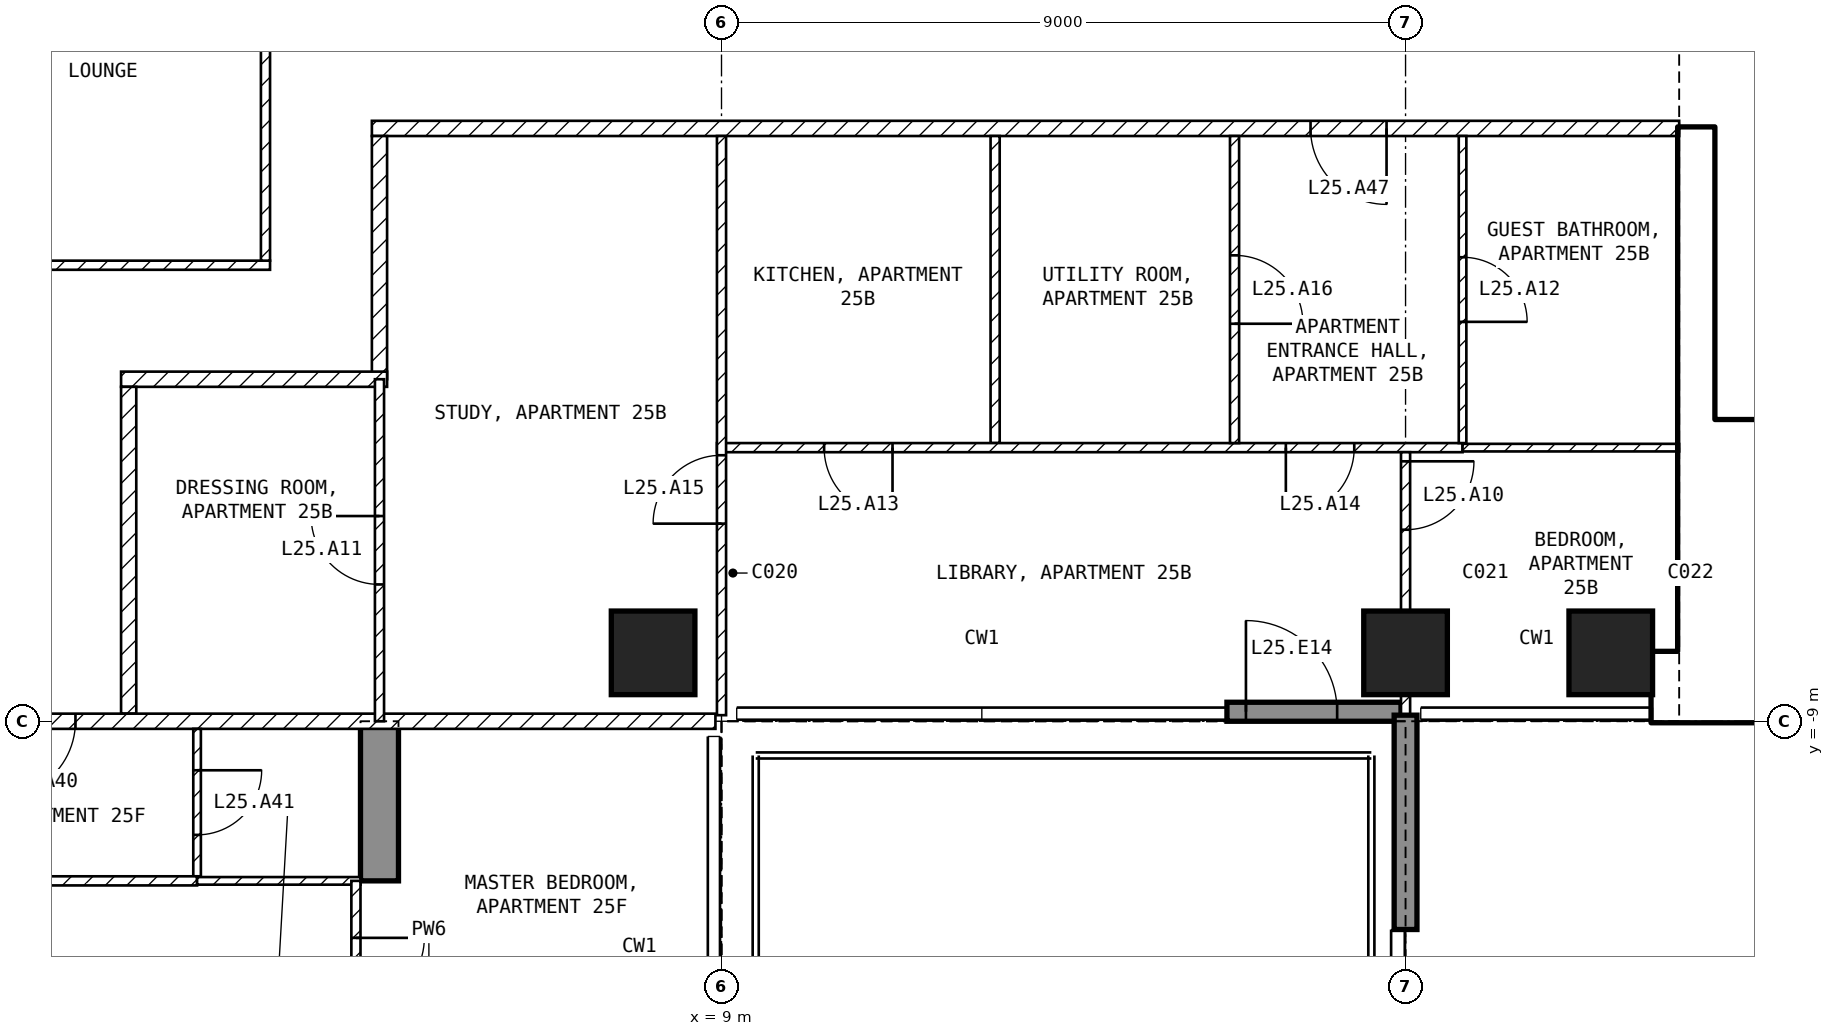
"""IFC4 building model, lengths in metres.
Left out: names, types, materials, properties, quantities, classifications, styles, units other than length and angle.
Written with IfcOpenShell. Run it as: python <this file> out.ifc"""

import sys

from ifc_helpers import new_model, si_unit, direction, frame, frame_2d, origin, origin_2d, place, context, subcontext, project, spatial, polyline, rectangle, outline, extrude, element, fill, save


model = new_model("IFC4")
c1 = context("Model", 3, precision=1e-05, world=origin(), true_north=direction((0.0, 1.0)))
c2 = subcontext(c1, "Body", "Model", "MODEL_VIEW")
j1 = project(units=[si_unit("LENGTHUNIT", "METRE"), si_unit("PLANEANGLEUNIT", "RADIAN")], contexts=[c1])
p1 = place(None, origin())
s1 = spatial("IfcSite", under=j1, at=p1, CompositionType="ELEMENT")
p2 = place(p1, origin())
s2 = spatial("IfcBuilding", under=s1, at=p2, CompositionType="ELEMENT")
p3 = place(p2, frame((0.0, 0.0, 109.4)))
s3 = spatial("IfcBuildingStorey", under=s2, at=p3, CompositionType="ELEMENT", Elevation=109.4)
for number, where, z_axis, x_axis in (
    (1, (8.1, -8.1, -0.25), (0.0, 0.0, 1.0), (1.0, 0.0, 0.0)),
    (2, (18.0, -8.1, -0.25), (0.0, 0.0, 1.0), (1.0, 0.0, 0.0)),
    (3, (20.7, -8.1, -0.25), (0.0, 0.0, 1.0), (1.0, 0.0, 0.0)),
):
    element("IfcColumn", number, at=place(p3, frame(where, z_axis=z_axis, x_axis=x_axis)), inside=s3, PredefinedType="COLUMN", context=c2, shape_type="SweptSolid", body=[
        extrude(rectangle(XDim=1.1, YDim=1.1, at=origin_2d()), origin(), (0.0, 0.0, 1.0), 3.5),
    ])
p4 = place(p3, frame((4.25, -20.15, -0.25), z_axis=(1.0, 0.0, 0.0), x_axis=(0.0, 1.0, 0.0)))
e4 = element("IfcWall", 4, at=p4, inside=s3, PredefinedType="SHEAR", context=c2, shape_type="SweptSolid", body=[
    extrude(outline(polyline([(0.0, 0.0), (6.65, 0.0), (6.65, 2.65), (9.05, 2.65), (9.05, 0.0), (11.15, 0.0), (11.15, 3.5), (0.0, 3.5), (0.0, 0.0)])), origin(), (0.0, 0.0, 1.0), 0.5),
])
p5 = place(p3, frame((15.65, -8.875, 0.0), z_axis=(0.0, 0.0, 1.0), x_axis=(1.0, 0.0, 0.0)))
e5 = element("IfcWall", 5, at=p5, inside=s3, PredefinedType="SOLIDWALL", context=c2, shape_type="SweptSolid", body=[
    extrude(rectangle(XDim=2.29, YDim=0.25, at=frame_2d((1.145, 0.0))), origin(), (0.0, 0.0, 1.0), 3.25),
])
p6 = place(p5, frame((0.25, 0.0, 0.0)))
e6 = element("IfcOpeningElement", 6, at=p6, cuts=e5, PredefinedType="OPENING", context=c2, shape_type="SweptSolid", body=[
    extrude(rectangle(XDim=1.2, YDim=2.4, at=frame_2d((0.6, 1.2))), frame((0.0, 0.135, 0.0), z_axis=(0.0, -1.0, 0.0), x_axis=(1.0, 0.0, 0.0)), (0.0, 0.0, 1.0), 0.27),
])
p7 = place(p3, frame((18.0, -8.92, 0.0), z_axis=(0.0, 0.0, 1.0), x_axis=(0.0, -1.0, 0.0)))
e7 = element("IfcWall", 7, at=p7, inside=s3, PredefinedType="SOLIDWALL", context=c2, shape_type="SweptSolid", body=[
    extrude(rectangle(XDim=2.82, YDim=0.3, at=frame_2d((1.41, 0.0))), origin(), (0.0, 0.0, 1.0), 3.25),
])
p8 = place(p3, frame((21.25, -8.55, 0.0), z_axis=(0.0, 0.0, 1.0), x_axis=(1.0, 0.0, 0.0)))
e8 = element("IfcWall", 8, at=p8, inside=s3, PredefinedType="SHEAR", context=c2, shape_type="SweptSolid", body=[
    extrude(rectangle(XDim=8.95, YDim=0.9, at=frame_2d((4.475, 0.0))), origin(), (0.0, 0.0, 1.0), 3.25),
])
p9 = place(p3, frame((21.825, -8.1, 0.0), z_axis=(0.0, 0.0, 1.0), x_axis=(0.0, 1.0, 0.0)))
e9 = element("IfcWall", 9, at=p9, inside=s3, PredefinedType="SHEAR", context=c2, shape_type="SweptSolid", body=[
    extrude(rectangle(XDim=6.9, YDim=0.45, at=frame_2d((3.45, 0.0))), origin(), (0.0, 0.0, 1.0), 3.25),
])
p10 = place(p3, frame((22.05, -5.15, 0.0), z_axis=(0.0, 0.0, 1.0), x_axis=(1.0, 0.0, 0.0)))
e10 = element("IfcWall", 10, at=p10, inside=s3, PredefinedType="SOLIDWALL", context=c2, shape_type="SweptSolid", body=[
    extrude(rectangle(XDim=6.3, YDim=0.2, at=frame_2d((3.15, 0.0))), origin(), (0.0, 0.0, 1.0), 3.25),
])
p11 = place(p10, frame((0.2, 0.0, 0.0)))
e11 = element("IfcOpeningElement", 11, at=p11, cuts=e10, PredefinedType="OPENING", context=c2, shape_type="SweptSolid", body=[
    extrude(rectangle(XDim=1.0, YDim=2.1, at=frame_2d((0.5, 1.05))), frame((0.0, 0.11, 0.0), z_axis=(0.0, -1.0, 0.0), x_axis=(1.0, 0.0, 0.0)), (0.0, 0.0, 1.0), 0.22),
])
p12 = place(p3, frame((-3.06, -3.0, 0.0), z_axis=(0.0, 0.0, 1.0), x_axis=(1.0, 0.0, 0.0)))
e12 = element("IfcWall", 12, at=p12, inside=s3, PredefinedType="PARTITIONING", context=c2, shape_type="SweptSolid", body=[
    extrude(rectangle(XDim=6.12, YDim=0.12, at=frame_2d((3.06, 0.0))), origin(), (0.0, 0.0, 1.0), 3.25),
])
p13 = place(p3, frame((3.0, -2.94, 0.0), z_axis=(0.0, 0.0, 1.0), x_axis=(0.0, 1.0, 0.0)))
e13 = element("IfcWall", 13, at=p13, inside=s3, PredefinedType="PARTITIONING", context=c2, shape_type="SweptSolid", body=[
    extrude(rectangle(XDim=5.88, YDim=0.12, at=frame_2d((2.94, 0.0))), origin(), (0.0, 0.0, 1.0), 3.25),
])
p14 = place(p3, frame((21.6, -1.2, 0.0), z_axis=(0.0, 0.0, 1.0), x_axis=(-1.0, 0.0, 0.0)))
e14 = element("IfcWall", 14, at=p14, inside=s3, PredefinedType="PARTITIONING", context=c2, shape_type="SweptSolid", body=[
    extrude(rectangle(XDim=17.2, YDim=0.2, at=frame_2d((8.6, 0.0))), origin(), (0.0, 0.0, 1.0), 3.25),
])
p15 = place(p14, frame((3.85, 0.0, 0.0)))
e15 = element("IfcOpeningElement", 15, at=p15, cuts=e14, PredefinedType="OPENING", context=c2, shape_type="SweptSolid", body=[
    extrude(rectangle(XDim=1.0, YDim=2.1, at=frame_2d((0.5, 1.05))), frame((0.0, 0.11, 0.0), z_axis=(0.0, -1.0, 0.0), x_axis=(1.0, 0.0, 0.0)), (0.0, 0.0, 1.0), 0.22),
])
p16 = place(p3, frame((4.5, -1.3, 0.0), z_axis=(0.0, 0.0, 1.0), x_axis=(0.0, -1.0, 0.0)))
e16 = element("IfcWall", 16, at=p16, inside=s3, PredefinedType="PARTITIONING", context=c2, shape_type="SweptSolid", body=[
    extrude(rectangle(XDim=3.2, YDim=0.2, at=frame_2d((1.6, 0.0))), origin(), (0.0, 0.0, 1.0), 3.25),
])
p17 = place(p3, frame((4.6, -4.5, 0.0), z_axis=(0.0, 0.0, 1.0), x_axis=(-1.0, 0.0, 0.0)))
e17 = element("IfcWall", 17, at=p17, inside=s3, PredefinedType="PARTITIONING", context=c2, shape_type="SweptSolid", body=[
    extrude(rectangle(XDim=3.5, YDim=0.2, at=frame_2d((1.75, 0.0))), origin(), (0.0, 0.0, 1.0), 3.25),
])
p18 = place(p3, frame((1.2, -4.6, 0.0), z_axis=(0.0, 0.0, 1.0), x_axis=(0.0, -1.0, 0.0)))
e18 = element("IfcWall", 18, at=p18, inside=s3, PredefinedType="PARTITIONING", context=c2, shape_type="SweptSolid", body=[
    extrude(rectangle(XDim=4.3, YDim=0.2, at=frame_2d((2.15, 0.0))), origin(), (0.0, 0.0, 1.0), 3.25),
])
p19 = place(p3, frame((8.92, -9.0, 0.0), z_axis=(0.0, 0.0, 1.0), x_axis=(-1.0, 0.0, 0.0)))
e19 = element("IfcWall", 19, at=p19, inside=s3, PredefinedType="PARTITIONING", context=c2, shape_type="SweptSolid", body=[
    extrude(rectangle(XDim=17.84, YDim=0.2, at=frame_2d((8.92, 0.0))), origin(), (0.0, 0.0, 1.0), 3.25),
])
p20 = place(p19, frame((8.42, 0.0, 0.0)))
e20 = element("IfcOpeningElement", 20, at=p20, cuts=e19, PredefinedType="OPENING", context=c2, shape_type="SweptSolid", body=[
    extrude(rectangle(XDim=1.0, YDim=2.1, at=frame_2d((0.5, 1.05))), frame((0.0, 0.11, 0.0), z_axis=(0.0, -1.0, 0.0), x_axis=(1.0, 0.0, 0.0)), (0.0, 0.0, 1.0), 0.22),
])
p21 = place(p3, frame((12.6, -1.3, 0.0), z_axis=(0.0, 0.0, 1.0), x_axis=(0.0, -1.0, 0.0)))
e21 = element("IfcWall", 21, at=p21, inside=s3, PredefinedType="PARTITIONING", context=c2, shape_type="SweptSolid", body=[
    extrude(rectangle(XDim=4.04, YDim=0.12, at=frame_2d((2.02, 0.0))), origin(), (0.0, 0.0, 1.0), 3.25),
])
p22 = place(p3, frame((18.75, -5.4, 0.0), z_axis=(0.0, 0.0, 1.0), x_axis=(-1.0, 0.0, 0.0)))
e22 = element("IfcWall", 22, at=p22, inside=s3, PredefinedType="PARTITIONING", context=c2, shape_type="SweptSolid", body=[
    extrude(rectangle(XDim=9.81, YDim=0.12, at=frame_2d((4.905, 0.0))), origin(), (0.0, 0.0, 1.0), 3.25),
])
p23 = place(p22, frame((7.5, 0.0, 0.0)))
e23 = element("IfcOpeningElement", 23, at=p23, cuts=e22, PredefinedType="OPENING", context=c2, shape_type="SweptSolid", body=[
    extrude(rectangle(XDim=0.9, YDim=2.1, at=frame_2d((0.45, 1.05))), frame((0.0, 0.07, 0.0), z_axis=(0.0, -1.0, 0.0), x_axis=(1.0, 0.0, 0.0)), (0.0, 0.0, 1.0), 0.14),
])
p24 = place(p22, frame((1.425, 0.0, 0.0)))
e24 = element("IfcOpeningElement", 24, at=p24, cuts=e22, PredefinedType="OPENING", context=c2, shape_type="SweptSolid", body=[
    extrude(rectangle(XDim=0.9, YDim=2.1, at=frame_2d((0.45, 1.05))), frame((0.0, 0.07, 0.0), z_axis=(0.0, -1.0, 0.0), x_axis=(1.0, 0.0, 0.0)), (0.0, 0.0, 1.0), 0.14),
])
p25 = place(p3, frame((9.0, -8.92, 0.0), z_axis=(0.0, 0.0, 1.0), x_axis=(0.0, 1.0, 0.0)))
e25 = element("IfcWall", 25, at=p25, inside=s3, PredefinedType="PARTITIONING", context=c2, shape_type="SweptSolid", body=[
    extrude(rectangle(XDim=7.62, YDim=0.12, at=frame_2d((3.81, 0.0))), origin(), (0.0, 0.0, 1.0), 3.25),
])
p26 = place(p25, frame((2.52, 0.0, 0.0)))
e26 = element("IfcOpeningElement", 26, at=p26, cuts=e25, PredefinedType="OPENING", context=c2, shape_type="SweptSolid", body=[
    extrude(rectangle(XDim=0.9, YDim=2.1, at=frame_2d((0.45, 1.05))), frame((0.0, 0.07, 0.0), z_axis=(0.0, -1.0, 0.0), x_axis=(1.0, 0.0, 0.0)), (0.0, 0.0, 1.0), 0.14),
])
p27 = place(p3, frame((15.75, -1.3, 0.0), z_axis=(0.0, 0.0, 1.0), x_axis=(0.0, -1.0, 0.0)))
e27 = element("IfcWall", 27, at=p27, inside=s3, PredefinedType="PARTITIONING", context=c2, shape_type="SweptSolid", body=[
    extrude(rectangle(XDim=4.04, YDim=0.12, at=frame_2d((2.02, 0.0))), origin(), (0.0, 0.0, 1.0), 3.25),
])
p28 = place(p27, frame((1.57, 0.0, 0.0)))
e28 = element("IfcOpeningElement", 28, at=p28, cuts=e27, PredefinedType="OPENING", context=c2, shape_type="SweptSolid", body=[
    extrude(rectangle(XDim=0.9, YDim=2.1, at=frame_2d((0.45, 1.05))), frame((0.0, 0.07, 0.0), z_axis=(0.0, -1.0, 0.0), x_axis=(1.0, 0.0, 0.0)), (0.0, 0.0, 1.0), 0.14),
])
p29 = place(p3, frame((18.75, -1.3, 0.0), z_axis=(0.0, 0.0, 1.0), x_axis=(0.0, -1.0, 0.0)))
e29 = element("IfcWall", 29, at=p29, inside=s3, PredefinedType="PARTITIONING", context=c2, shape_type="SweptSolid", body=[
    extrude(rectangle(XDim=4.04, YDim=0.1, at=frame_2d((2.02, 0.0))), origin(), (0.0, 0.0, 1.0), 3.25),
])
p30 = place(p29, frame((1.595, 0.0, 0.0)))
e30 = element("IfcOpeningElement", 30, at=p30, cuts=e29, PredefinedType="OPENING", context=c2, shape_type="SweptSolid", body=[
    extrude(rectangle(XDim=0.85, YDim=2.1, at=frame_2d((0.425, 1.05))), frame((0.0, 0.06, 0.0), z_axis=(0.0, -1.0, 0.0), x_axis=(1.0, 0.0, 0.0)), (0.0, 0.0, 1.0), 0.12),
])
p31 = place(p3, frame((21.6, -5.4, 0.0), z_axis=(0.0, 0.0, 1.0), x_axis=(-1.0, 0.0, 0.0)))
e31 = element("IfcWall", 31, at=p31, inside=s3, PredefinedType="PARTITIONING", context=c2, shape_type="SweptSolid", body=[
    extrude(rectangle(XDim=2.85, YDim=0.1, at=frame_2d((1.425, 0.0))), origin(), (0.0, 0.0, 1.0), 3.25),
])
p32 = place(p3, frame((18.0, -5.46, 0.0), z_axis=(0.0, 0.0, 1.0), x_axis=(0.0, -1.0, 0.0)))
e32 = element("IfcWall", 32, at=p32, inside=s3, PredefinedType="PARTITIONING", context=c2, shape_type="SweptSolid", body=[
    extrude(rectangle(XDim=3.46, YDim=0.12, at=frame_2d((1.73, 0.0))), origin(), (0.0, 0.0, 1.0), 2.414),
])
p33 = place(p32, frame((0.12, 0.0, 0.0)))
e33 = element("IfcOpeningElement", 33, at=p33, cuts=e32, PredefinedType="OPENING", context=c2, shape_type="SweptSolid", body=[
    extrude(rectangle(XDim=0.9, YDim=2.1, at=frame_2d((0.45, 1.05))), frame((0.0, 0.07, 0.0), z_axis=(0.0, -1.0, 0.0), x_axis=(1.0, 0.0, 0.0)), (0.0, 0.0, 1.0), 0.14),
])
p34 = place(p3, frame((4.5, -9.0, 0.0), z_axis=(0.0, 0.0, 1.0), x_axis=(0.0, 1.0, 0.0)))
e34 = element("IfcWall", 34, at=p34, inside=s3, PredefinedType="PARTITIONING", context=c2, shape_type="SweptSolid", body=[
    extrude(rectangle(XDim=4.5, YDim=0.12, at=frame_2d((2.25, 0.0))), origin(), (0.0, 0.0, 1.0), 3.25),
])
p35 = place(p34, frame((1.8, 0.0, 0.0)))
e35 = element("IfcOpeningElement", 35, at=p35, cuts=e34, PredefinedType="OPENING", context=c2, shape_type="SweptSolid", body=[
    extrude(rectangle(XDim=0.9, YDim=2.1, at=frame_2d((0.45, 1.05))), frame((0.0, 0.07, 0.0), z_axis=(0.0, -1.0, 0.0), x_axis=(1.0, 0.0, 0.0)), (0.0, 0.0, 1.0), 0.14),
])
p36 = place(p3, frame((2.1, -9.1, 0.0), z_axis=(0.0, 0.0, 1.0), x_axis=(0.0, -1.0, 0.0)))
e36 = element("IfcWall", 36, at=p36, inside=s3, PredefinedType="PARTITIONING", context=c2, shape_type="SweptSolid", body=[
    extrude(rectangle(XDim=1.94, YDim=0.1, at=frame_2d((0.97, 0.0))), origin(), (0.0, 0.0, 1.0), 3.25),
])
p37 = place(p36, frame((0.545, 0.0, 0.0)))
e37 = element("IfcOpeningElement", 37, at=p37, cuts=e36, PredefinedType="OPENING", context=c2, shape_type="SweptSolid", body=[
    extrude(rectangle(XDim=0.85, YDim=2.1, at=frame_2d((0.425, 1.05))), frame((0.0, 0.06, 0.0), z_axis=(0.0, -1.0, 0.0), x_axis=(1.0, 0.0, 0.0)), (0.0, 0.0, 1.0), 0.12),
])
p38 = place(p3, frame((2.1, -11.1, 0.0), z_axis=(0.0, 0.0, 1.0), x_axis=(-1.0, 0.0, 0.0)))
e38 = element("IfcWall", 38, at=p38, inside=s3, PredefinedType="PARTITIONING", context=c2, shape_type="SweptSolid", body=[
    extrude(rectangle(XDim=6.35, YDim=0.12, at=frame_2d((3.175, 0.0))), origin(), (0.0, 0.0, 1.0), 3.25),
])
p39 = place(p38, frame((2.725, 0.0, 0.0)))
e39 = element("IfcOpeningElement", 39, at=p39, cuts=e38, PredefinedType="OPENING", context=c2, shape_type="SweptSolid", body=[
    extrude(rectangle(XDim=0.9, YDim=2.1, at=frame_2d((0.45, 1.05))), frame((0.0, 0.07, 0.0), z_axis=(0.0, -1.0, 0.0), x_axis=(1.0, 0.0, 0.0)), (0.0, 0.0, 1.0), 0.14),
])
p40 = place(p3, frame((4.25, -11.1, 0.0), z_axis=(0.0, 0.0, 1.0), x_axis=(-1.0, 0.0, 0.0)))
e40 = element("IfcWall", 40, at=p40, inside=s3, PredefinedType="PARTITIONING", context=c2, shape_type="SweptSolid", body=[
    extrude(rectangle(XDim=2.15, YDim=0.1, at=frame_2d((1.075, 0.0))), origin(), (0.0, 0.0, 1.0), 3.25),
])
p41 = place(p3, frame((4.19, -11.1, 0.0), z_axis=(0.0, 0.0, 1.0), x_axis=(0.0, -1.0, 0.0)))
e41 = element("IfcWall", 41, at=p41, inside=s3, PredefinedType="PARTITIONING", context=c2, shape_type="SweptSolid", body=[
    extrude(rectangle(XDim=2.4, YDim=0.12, at=frame_2d((1.2, 0.0))), origin(), (0.0, 0.0, 1.0), 2.4),
])
p42 = place(p41, frame((0.75, 0.0, 0.0)))
e42 = element("IfcOpeningElement", 42, at=p42, cuts=e41, PredefinedType="OPENING", context=c2, shape_type="SweptSolid", body=[
    extrude(rectangle(XDim=0.9, YDim=2.1, at=frame_2d((0.45, 1.05))), frame((0.0, 0.07, 0.0), z_axis=(0.0, -1.0, 0.0), x_axis=(1.0, 0.0, 0.0)), (0.0, 0.0, 1.0), 0.14),
])
p43 = place(p6, origin())
e43 = element("IfcDoor", 43, at=p43, inside=s3, OperationType="SINGLE_SWING_LEFT", PredefinedType="DOOR", context=c2, shape_type="SweptSolid", body=[
    extrude(rectangle(XDim=1.2, YDim=2.4, at=frame_2d((0.6, 1.2))), frame((0.0, 0.025, 0.0), z_axis=(0.0, -1.0, 0.0), x_axis=(1.0, 0.0, 0.0)), (0.0, 0.0, 1.0), 0.05),
])
fill(e6, e43)
p44 = place(p11, origin())
e44 = element("IfcDoor", 44, at=p44, inside=s3, OperationType="SINGLE_SWING_LEFT", PredefinedType="DOOR", context=c2, shape_type="SweptSolid", body=[
    extrude(rectangle(XDim=1.0, YDim=2.1, at=frame_2d((0.5, 1.05))), frame((0.0, 0.025, 0.0), z_axis=(0.0, -1.0, 0.0), x_axis=(1.0, 0.0, 0.0)), (0.0, 0.0, 1.0), 0.05),
])
fill(e11, e44)
p45 = place(p33, origin())
e45 = element("IfcDoor", 45, at=p45, inside=s3, OperationType="SINGLE_SWING_LEFT", PredefinedType="DOOR", context=c2, shape_type="SweptSolid", body=[
    extrude(rectangle(XDim=0.9, YDim=2.1, at=frame_2d((0.45, 1.05))), frame((0.0, 0.025, 0.0), z_axis=(0.0, -1.0, 0.0), x_axis=(1.0, 0.0, 0.0)), (0.0, 0.0, 1.0), 0.05),
])
fill(e33, e45)
p46 = place(p35, origin())
e46 = element("IfcDoor", 46, at=p46, inside=s3, OperationType="SINGLE_SWING_RIGHT", PredefinedType="DOOR", context=c2, shape_type="SweptSolid", body=[
    extrude(rectangle(XDim=0.9, YDim=2.1, at=frame_2d((0.45, 1.05))), frame((0.0, 0.025, 0.0), z_axis=(0.0, -1.0, 0.0), x_axis=(1.0, 0.0, 0.0)), (0.0, 0.0, 1.0), 0.05),
])
fill(e35, e46)
p47 = place(p30, origin())
e47 = element("IfcDoor", 47, at=p47, inside=s3, OperationType="SINGLE_SWING_RIGHT", PredefinedType="DOOR", context=c2, shape_type="SweptSolid", body=[
    extrude(rectangle(XDim=0.85, YDim=2.1, at=frame_2d((0.425, 1.05))), frame((0.0, 0.025, 0.0), z_axis=(0.0, -1.0, 0.0), x_axis=(1.0, 0.0, 0.0)), (0.0, 0.0, 1.0), 0.05),
])
fill(e30, e47)
p48 = place(p23, origin())
e48 = element("IfcDoor", 48, at=p48, inside=s3, OperationType="SINGLE_SWING_LEFT", PredefinedType="DOOR", context=c2, shape_type="SweptSolid", body=[
    extrude(rectangle(XDim=0.9, YDim=2.1, at=frame_2d((0.45, 1.05))), frame((0.0, 0.025, 0.0), z_axis=(0.0, -1.0, 0.0), x_axis=(1.0, 0.0, 0.0)), (0.0, 0.0, 1.0), 0.05),
])
fill(e23, e48)
p49 = place(p24, origin())
e49 = element("IfcDoor", 49, at=p49, inside=s3, OperationType="SINGLE_SWING_RIGHT", PredefinedType="DOOR", context=c2, shape_type="SweptSolid", body=[
    extrude(rectangle(XDim=0.9, YDim=2.1, at=frame_2d((0.45, 1.05))), frame((0.0, 0.025, 0.0), z_axis=(0.0, -1.0, 0.0), x_axis=(1.0, 0.0, 0.0)), (0.0, 0.0, 1.0), 0.05),
])
fill(e24, e49)
p50 = place(p26, origin())
e50 = element("IfcDoor", 50, at=p50, inside=s3, OperationType="SINGLE_SWING_LEFT", PredefinedType="DOOR", context=c2, shape_type="SweptSolid", body=[
    extrude(rectangle(XDim=0.9, YDim=2.1, at=frame_2d((0.45, 1.05))), frame((0.0, 0.025, 0.0), z_axis=(0.0, -1.0, 0.0), x_axis=(1.0, 0.0, 0.0)), (0.0, 0.0, 1.0), 0.05),
])
fill(e26, e50)
p51 = place(p28, origin())
e51 = element("IfcDoor", 51, at=p51, inside=s3, OperationType="SINGLE_SWING_RIGHT", PredefinedType="DOOR", context=c2, shape_type="SweptSolid", body=[
    extrude(rectangle(XDim=0.9, YDim=2.1, at=frame_2d((0.45, 1.05))), frame((0.0, 0.025, 0.0), z_axis=(0.0, -1.0, 0.0), x_axis=(1.0, 0.0, 0.0)), (0.0, 0.0, 1.0), 0.05),
])
fill(e28, e51)
p52 = place(p20, origin())
e52 = element("IfcDoor", 52, at=p52, inside=s3, OperationType="SINGLE_SWING_RIGHT", PredefinedType="DOOR", context=c2, shape_type="SweptSolid", body=[
    extrude(rectangle(XDim=1.0, YDim=2.1, at=frame_2d((0.5, 1.05))), frame((0.0, 0.025, 0.0), z_axis=(0.0, -1.0, 0.0), x_axis=(1.0, 0.0, 0.0)), (0.0, 0.0, 1.0), 0.05),
])
fill(e20, e52)
p53 = place(p37, origin())
e53 = element("IfcDoor", 53, at=p53, inside=s3, OperationType="SINGLE_SWING_LEFT", PredefinedType="DOOR", context=c2, shape_type="SweptSolid", body=[
    extrude(rectangle(XDim=0.85, YDim=2.1, at=frame_2d((0.425, 1.05))), frame((0.0, 0.025, 0.0), z_axis=(0.0, -1.0, 0.0), x_axis=(1.0, 0.0, 0.0)), (0.0, 0.0, 1.0), 0.05),
])
fill(e37, e53)
p54 = place(p15, origin())
e54 = element("IfcDoor", 54, at=p54, inside=s3, OperationType="SINGLE_SWING_LEFT", PredefinedType="DOOR", context=c2, shape_type="SweptSolid", body=[
    extrude(rectangle(XDim=1.0, YDim=2.1, at=frame_2d((0.5, 1.05))), frame((0.0, 0.025, 0.0), z_axis=(0.0, -1.0, 0.0), x_axis=(1.0, 0.0, 0.0)), (0.0, 0.0, 1.0), 0.05),
])
fill(e15, e54)
p55 = place(p42, origin())
e55 = element("IfcDoor", 55, at=p55, inside=s3, OperationType="SINGLE_SWING_LEFT", PredefinedType="DOOR", context=c2, shape_type="SweptSolid", body=[
    extrude(rectangle(XDim=0.9, YDim=2.1, at=frame_2d((0.45, 1.05))), frame((0.0, 0.025, 0.0), z_axis=(0.0, -1.0, 0.0), x_axis=(1.0, 0.0, 0.0)), (0.0, 0.0, 1.0), 0.05),
])
fill(e42, e55)
save(model, sys.argv[1])
